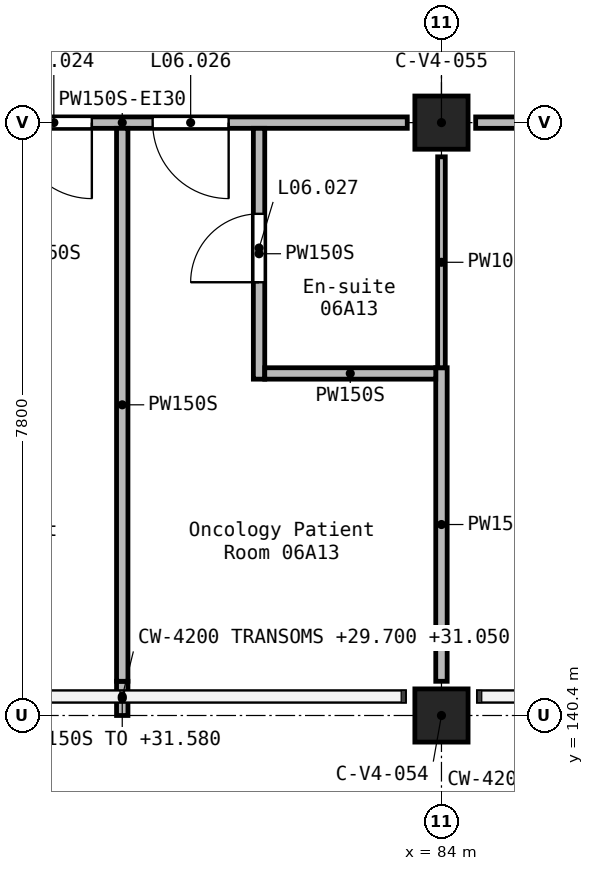
"""IFC4 building model, lengths in metres.
Left out: names, types, materials, properties, quantities, classifications, styles, units other than length and angle.
Written with IfcOpenShell. Run it as: python <this file> out.ifc"""

import sys

from ifc_helpers import new_model, si_unit, direction, frame, frame_2d, origin, origin_2d, place, context, subcontext, project, spatial, rectangle, extrude, element, fill, save


model = new_model("IFC4")
c1 = context("Model", 3, precision=1e-05, world=origin(), true_north=direction((0.0, 1.0)))
c2 = subcontext(c1, "Body", "Model", "MODEL_VIEW")
j1 = project(units=[si_unit("LENGTHUNIT", "METRE"), si_unit("PLANEANGLEUNIT", "RADIAN")], contexts=[c1])
p1 = place(None, origin())
s1 = spatial("IfcSite", under=j1, at=p1, CompositionType="ELEMENT")
p2 = place(p1, origin())
s2 = spatial("IfcBuilding", under=s1, at=p2, CompositionType="ELEMENT")
p3 = place(p2, frame((0.0, 0.0, 28.8)))
s3 = spatial("IfcBuildingStorey", under=s2, at=p3, CompositionType="ELEMENT", Elevation=28.8)
for number, where, z_axis, x_axis in (
    (1, (84.0, 140.4, 0.0), (0.0, 0.0, 1.0), (1.0, 0.0, 0.0)),
    (2, (84.0, 148.2, 0.0), (0.0, 0.0, 1.0), (1.0, 0.0, 0.0)),
):
    element("IfcColumn", number, at=place(p3, frame(where, z_axis=z_axis, x_axis=x_axis)), inside=s3, PredefinedType="COLUMN", context=c2, shape_type="SweptSolid", body=[
        extrude(rectangle(XDim=0.7, YDim=0.7, at=origin_2d()), origin(), (0.0, 0.0, 1.0), 3.9),
    ])
p4 = place(p3, frame((91.95, 148.2, 0.0), z_axis=(0.0, 0.0, 1.0), x_axis=(-1.0, 0.0, 0.0)))
e3 = element("IfcWall", 3, at=p4, inside=s3, PredefinedType="PARTITIONING", context=c2, shape_type="SweptSolid", body=[
    extrude(rectangle(XDim=7.5, YDim=0.15, at=frame_2d((3.75, 0.0))), origin(), (0.0, 0.0, 1.0), 3.6),
])
p5 = place(p4, frame((3.9, 0.0, 0.0)))
e4 = element("IfcOpeningElement", 4, at=p5, cuts=e3, PredefinedType="OPENING", context=c2, shape_type="SweptSolid", body=[
    extrude(rectangle(XDim=1.8, YDim=2.1, at=frame_2d((0.9, 1.05))), frame((0.0, 0.085, 0.0), z_axis=(0.0, -1.0, 0.0), x_axis=(1.0, 0.0, 0.0)), (0.0, 0.0, 1.0), 0.17),
])
p6 = place(p4, frame((0.1, 0.0, 0.0)))
e5 = element("IfcOpeningElement", 5, at=p6, cuts=e3, PredefinedType="OPENING", context=c2, shape_type="SweptSolid", body=[
    extrude(rectangle(XDim=0.9, YDim=2.1, at=frame_2d((0.45, 1.05))), frame((0.0, 0.085, 0.0), z_axis=(0.0, -1.0, 0.0), x_axis=(1.0, 0.0, 0.0)), (0.0, 0.0, 1.0), 0.17),
])
p7 = place(p3, frame((83.55, 148.2, 0.0), z_axis=(0.0, 0.0, 1.0), x_axis=(-1.0, 0.0, 0.0)))
e6 = element("IfcWall", 6, at=p7, inside=s3, PredefinedType="PARTITIONING", context=c2, shape_type="SweptSolid", body=[
    extrude(rectangle(XDim=7.5, YDim=0.15, at=frame_2d((3.75, 0.0))), origin(), (0.0, 0.0, 1.0), 3.6),
])
p8 = place(p7, frame((4.15, 0.0, 0.0)))
e7 = element("IfcOpeningElement", 7, at=p8, cuts=e6, PredefinedType="OPENING", context=c2, shape_type="SweptSolid", body=[
    extrude(rectangle(XDim=1.0, YDim=2.1, at=frame_2d((0.5, 1.05))), frame((0.0, 0.085, 0.0), z_axis=(0.0, -1.0, 0.0), x_axis=(1.0, 0.0, 0.0)), (0.0, 0.0, 1.0), 0.17),
])
p9 = place(p7, frame((2.35, 0.0, 0.0)))
e8 = element("IfcOpeningElement", 8, at=p9, cuts=e6, PredefinedType="OPENING", context=c2, shape_type="SweptSolid", body=[
    extrude(rectangle(XDim=1.0, YDim=2.1, at=frame_2d((0.5, 1.05))), frame((0.0, 0.085, 0.0), z_axis=(0.0, -1.0, 0.0), x_axis=(1.0, 0.0, 0.0)), (0.0, 0.0, 1.0), 0.17),
])
p10 = place(p3, frame((79.8, 140.4, 0.0), z_axis=(0.0, 0.0, 1.0), x_axis=(0.0, 1.0, 0.0)))
e9 = element("IfcWall", 9, at=p10, inside=s3, PredefinedType="PARTITIONING", context=c2, shape_type="SweptSolid", body=[
    extrude(rectangle(XDim=0.45, YDim=0.15, at=frame_2d((0.225, 0.0))), origin(), (0.0, 0.0, 1.0), 2.78),
])
p11 = place(p3, frame((79.8, 140.85, 0.0), z_axis=(0.0, 0.0, 1.0), x_axis=(0.0, 1.0, 0.0)))
e10 = element("IfcWall", 10, at=p11, inside=s3, PredefinedType="PARTITIONING", context=c2, shape_type="SweptSolid", body=[
    extrude(rectangle(XDim=7.275, YDim=0.15, at=frame_2d((3.637, 0.0))), origin(), (0.0, 0.0, 1.0), 3.6),
])
p12 = place(p3, frame((84.0, 140.85, 0.0), z_axis=(0.0, 0.0, 1.0), x_axis=(0.0, 1.0, 0.0)))
e11 = element("IfcWall", 11, at=p12, inside=s3, PredefinedType="PARTITIONING", context=c2, shape_type="SweptSolid", body=[
    extrude(rectangle(XDim=4.125, YDim=0.15, at=frame_2d((2.062, 0.0))), origin(), (0.0, 0.0, 1.0), 3.6),
])
p13 = place(p3, frame((81.6, 144.825, 0.0), z_axis=(0.0, 0.0, 1.0), x_axis=(0.0, 1.0, 0.0)))
e12 = element("IfcWall", 12, at=p13, inside=s3, PredefinedType="PARTITIONING", context=c2, shape_type="SweptSolid", body=[
    extrude(rectangle(XDim=3.3, YDim=0.15, at=frame_2d((1.65, 0.0))), origin(), (0.0, 0.0, 1.0), 3.6),
])
p14 = place(p13, frame((1.275, 0.0, 0.0)))
e13 = element("IfcOpeningElement", 13, at=p14, cuts=e12, PredefinedType="OPENING", context=c2, shape_type="SweptSolid", body=[
    extrude(rectangle(XDim=0.9, YDim=2.1, at=frame_2d((0.45, 1.05))), frame((0.0, 0.085, 0.0), z_axis=(0.0, -1.0, 0.0), x_axis=(1.0, 0.0, 0.0)), (0.0, 0.0, 1.0), 0.17),
])
p15 = place(p3, frame((81.675, 144.9, 0.0), z_axis=(0.0, 0.0, 1.0), x_axis=(1.0, 0.0, 0.0)))
e14 = element("IfcWall", 14, at=p15, inside=s3, PredefinedType="PARTITIONING", context=c2, shape_type="SweptSolid", body=[
    extrude(rectangle(XDim=2.25, YDim=0.15, at=frame_2d((1.125, 0.0))), origin(), (0.0, 0.0, 1.0), 3.6),
])
p16 = place(p3, frame((84.0, 144.975, 0.0), z_axis=(0.0, 0.0, 1.0), x_axis=(0.0, 1.0, 0.0)))
e15 = element("IfcWall", 15, at=p16, inside=s3, PredefinedType="PARTITIONING", context=c2, shape_type="SweptSolid", body=[
    extrude(rectangle(XDim=2.775, YDim=0.1, at=frame_2d((1.387, 0.0))), origin(), (0.0, 0.0, 1.0), 3.6),
])
p17 = place(p8, origin())
e16 = element("IfcDoor", 16, at=p17, inside=s3, OperationType="SINGLE_SWING_RIGHT", PredefinedType="DOOR", context=c2, shape_type="SweptSolid", body=[
    extrude(rectangle(XDim=1.0, YDim=2.1, at=frame_2d((0.5, 1.05))), frame((0.0, 0.025, 0.0), z_axis=(0.0, -1.0, 0.0), x_axis=(1.0, 0.0, 0.0)), (0.0, 0.0, 1.0), 0.05),
])
fill(e7, e16)
p18 = place(p9, origin())
e17 = element("IfcDoor", 17, at=p18, inside=s3, OperationType="SINGLE_SWING_LEFT", PredefinedType="DOOR", context=c2, shape_type="SweptSolid", body=[
    extrude(rectangle(XDim=1.0, YDim=2.1, at=frame_2d((0.5, 1.05))), frame((0.0, 0.025, 0.0), z_axis=(0.0, -1.0, 0.0), x_axis=(1.0, 0.0, 0.0)), (0.0, 0.0, 1.0), 0.05),
])
fill(e8, e17)
p19 = place(p14, frame((0.9, 0.0, 0.0), z_axis=(0.0, 0.0, 1.0), x_axis=(-1.0, 0.0, 0.0)))
e18 = element("IfcDoor", 18, at=p19, inside=s3, OperationType="SINGLE_SWING_LEFT", PredefinedType="DOOR", context=c2, shape_type="SweptSolid", body=[
    extrude(rectangle(XDim=0.9, YDim=2.1, at=frame_2d((0.45, 1.05))), frame((0.0, 0.025, 0.0), z_axis=(0.0, -1.0, 0.0), x_axis=(1.0, 0.0, 0.0)), (0.0, 0.0, 1.0), 0.05),
])
fill(e13, e18)
save(model, sys.argv[1])
